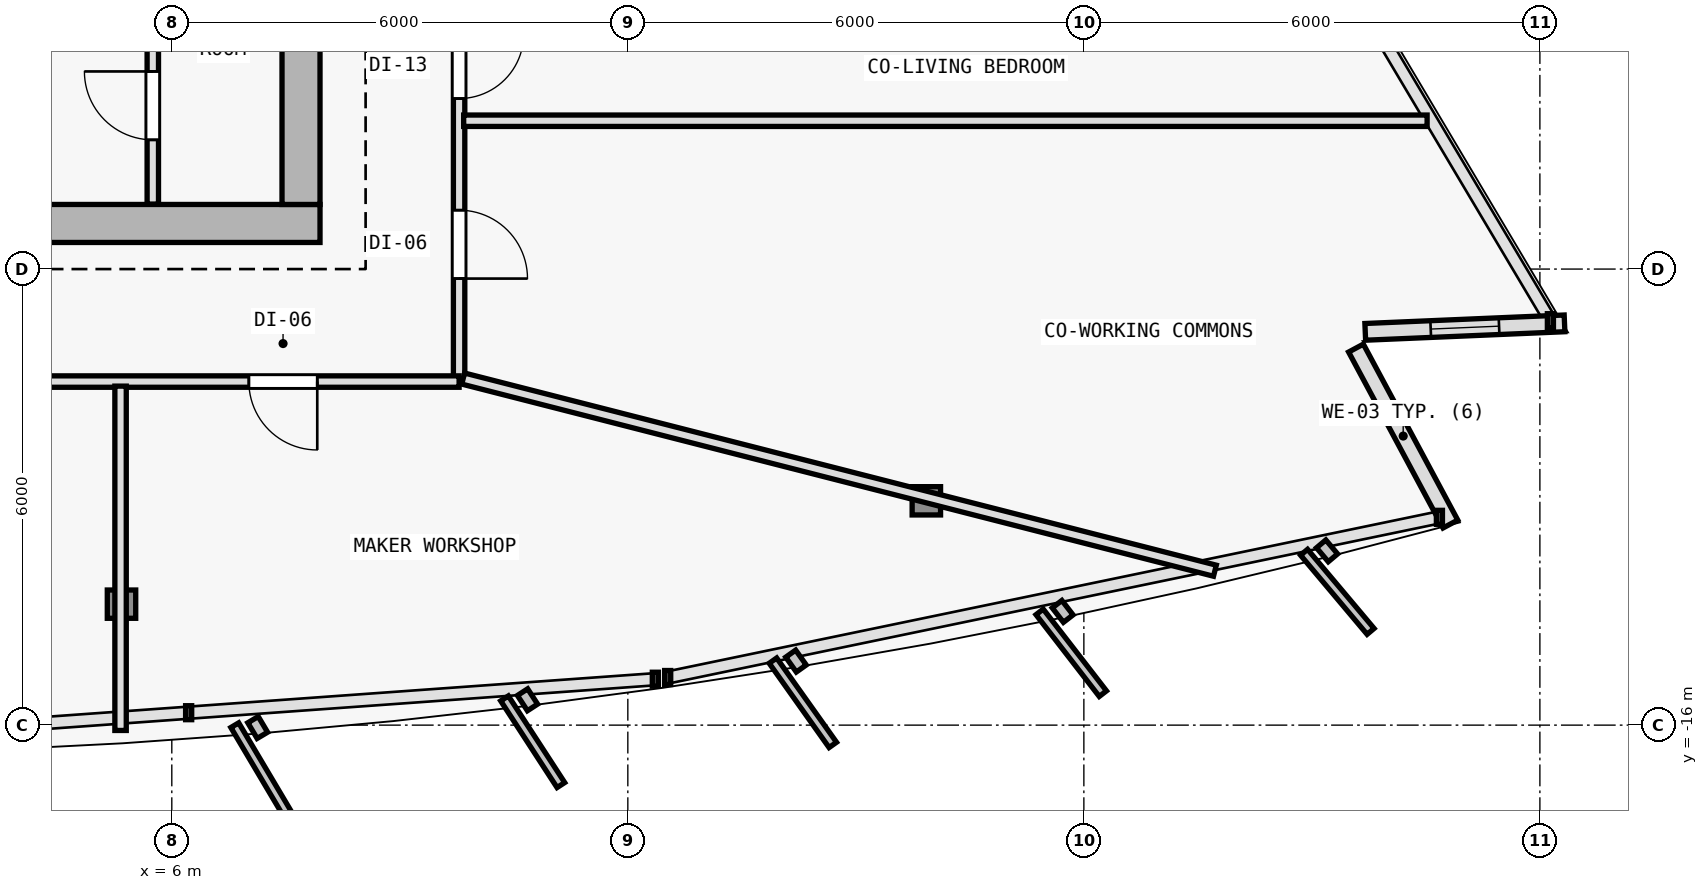
"""IFC4 building model, lengths in metres.
Left out: names, types, materials, properties, quantities, classifications, styles, units other than length and angle.
Written with IfcOpenShell. Run it as: python <this file> out.ifc"""

import sys

from ifc_helpers import new_model, si_unit, direction, frame, frame_2d, origin, origin_2d, place, context, subcontext, project, spatial, rectangle, i_section, extrude, element, fill, save


model = new_model("IFC4")
c1 = context("Model", 3, precision=1e-05, world=origin(), true_north=direction((0.0, 1.0)))
c2 = subcontext(c1, "Body", "Model", "MODEL_VIEW")
j1 = project(units=[si_unit("LENGTHUNIT", "METRE"), si_unit("PLANEANGLEUNIT", "RADIAN")], contexts=[c1])
p1 = place(None, origin())
s1 = spatial("IfcSite", under=j1, at=p1, CompositionType="ELEMENT")
p2 = place(p1, origin())
s2 = spatial("IfcBuilding", under=s1, at=p2, CompositionType="ELEMENT")
p3 = place(p2, frame((0.0, 0.0, 250.8)))
s3 = spatial("IfcBuildingStorey", under=s2, at=p3, CompositionType="ELEMENT", Elevation=250.8)
p4 = place(p3, frame((7.7, -9.4, 0.0), z_axis=(0.0, 0.0, 1.0), x_axis=(1.0, 0.0, 0.0)))
e1 = element("IfcColumn", 1, at=p4, inside=s3, PredefinedType="COLUMN", context=c2, shape_type="SweptSolid", body=[
    extrude(i_section(OverallWidth=0.374, OverallDepth=0.372, WebThickness=0.012, FlangeThickness=0.02, FilletRadius=0.015, at=origin_2d()), origin(), (0.0, 0.0, 1.0), 3.6),
])
p5 = place(p3, frame((5.338, -14.408, 0.005), z_axis=(-0.006865841702, 0.035280909339, 0.999353850072), x_axis=(-0.981585848295, -0.191021523464, 0.0)))
e2 = element("IfcColumn", 2, at=p5, inside=s3, PredefinedType="COLUMN", context=c2, shape_type="SweptSolid", body=[
    extrude(i_section(OverallWidth=0.374, OverallDepth=0.372, WebThickness=0.012, FlangeThickness=0.02, FilletRadius=0.015, at=origin_2d()), origin(), (0.0, 0.0, 1.0), 3.592),
])
p6 = place(p3, frame((15.927, -13.049, 0.005), z_axis=(-0.020594893987, 0.033509183946, 0.999226193078), x_axis=(-0.851954850327, -0.523615252838, 0.0)))
e3 = element("IfcColumn", 3, at=p6, inside=s3, PredefinedType="COLUMN", context=c2, shape_type="SweptSolid", body=[
    extrude(i_section(OverallWidth=0.374, OverallDepth=0.372, WebThickness=0.012, FlangeThickness=0.02, FilletRadius=0.015, at=origin_2d()), origin(), (0.0, 0.0, 1.0), 3.592),
])
p7 = place(p3, frame((21.581, -11.04, 0.0), z_axis=(0.0, 0.0, 1.0), x_axis=(0.472791303324, -0.881174434208, 0.0)))
e4 = element("IfcWall", 4, at=p7, inside=s3, PredefinedType="SOLIDWALL", context=c2, shape_type="SweptSolid", body=[
    extrude(rectangle(XDim=2.627, YDim=0.22, at=frame_2d((1.313, 0.0))), origin(), (0.0, 0.0, 1.0), 3.35),
])
p8 = place(p3, frame((24.324, -10.714, 0.0), z_axis=(0.0, 0.0, 1.0), x_axis=(-0.999095924753, -0.042512740932, 0.0)))
e5 = element("IfcWall", 5, at=p8, inside=s3, PredefinedType="SOLIDWALL", context=c2, shape_type="SweptSolid", body=[
    extrude(rectangle(XDim=2.625, YDim=0.22, at=frame_2d((1.312, 0.0))), origin(), (0.0, 0.0, 1.0), 3.35),
])
p9 = place(p8, frame((0.862, 0.0, 0.62)))
e6 = element("IfcOpeningElement", 6, at=p9, cuts=e5, PredefinedType="OPENING", context=c2, shape_type="SweptSolid", body=[
    extrude(rectangle(XDim=0.9, YDim=1.6, at=frame_2d((0.45, 0.8))), frame((0.0, 0.12, 0.0), z_axis=(0.0, -1.0, 0.0), x_axis=(1.0, 0.0, 0.0)), (0.0, 0.0, 1.0), 0.24),
])
p10 = place(p3, frame((-7.95, -9.4, 0.0), z_axis=(0.0, 0.0, 1.0), x_axis=(1.0, 0.0, 0.0)))
e7 = element("IfcWall", 7, at=p10, inside=s3, PredefinedType="SHEAR", context=c2, shape_type="SweptSolid", body=[
    extrude(rectangle(XDim=15.9, YDim=0.5, at=frame_2d((7.95, 0.0))), origin(), (0.0, 0.0, 1.0), 3.35),
])
p11 = place(p10, frame((9.6, 0.0, 0.0)))
e8 = element("IfcOpeningElement", 8, at=p11, cuts=e7, PredefinedType="OPENING", context=c2, shape_type="SweptSolid", body=[
    extrude(rectangle(XDim=1.5, YDim=2.2, at=frame_2d((0.75, 1.1))), frame((0.0, 0.26, 0.0), z_axis=(0.0, -1.0, 0.0), x_axis=(1.0, 0.0, 0.0)), (0.0, 0.0, 1.0), 0.52),
])
p12 = place(p3, frame((7.7, 9.95, 0.0), z_axis=(0.0, 0.0, 1.0), x_axis=(0.0, -1.0, 0.0)))
e9 = element("IfcWall", 9, at=p12, inside=s3, PredefinedType="SHEAR", context=c2, shape_type="SweptSolid", body=[
    extrude(rectangle(XDim=19.1, YDim=0.5, at=frame_2d((9.55, 0.0))), origin(), (0.0, 0.0, 1.0), 3.35),
])
p13 = place(p3, frame((5.75, -9.145, 0.0), z_axis=(0.0, 0.0, 1.0), x_axis=(0.0, 1.0, 0.0)))
e10 = element("IfcWall", 10, at=p13, inside=s3, PredefinedType="PARTITIONING", context=c2, shape_type="SweptSolid", body=[
    extrude(rectangle(XDim=3.095, YDim=0.15, at=frame_2d((1.547, 0.0))), origin(), (0.0, 0.0, 1.0), 3.35),
])
p14 = place(p13, frame((0.845, 0.0, 0.0)))
e11 = element("IfcOpeningElement", 11, at=p14, cuts=e10, PredefinedType="OPENING", context=c2, shape_type="SweptSolid", body=[
    extrude(rectangle(XDim=0.9, YDim=2.1, at=frame_2d((0.45, 1.05))), frame((0.0, 0.085, 0.0), z_axis=(0.0, -1.0, 0.0), x_axis=(1.0, 0.0, 0.0)), (0.0, 0.0, 1.0), 0.17),
])
p15 = place(p3, frame((9.78, 8.226, 0.0), z_axis=(0.0, 0.0, 1.0), x_axis=(0.0, -1.0, 0.0)))
e12 = element("IfcWall", 12, at=p15, inside=s3, PredefinedType="PARTITIONING", context=c2, shape_type="SweptSolid", body=[
    extrude(rectangle(XDim=19.706, YDim=0.15, at=frame_2d((9.853, 0.0))), origin(), (0.0, 0.0, 1.0), 2.775),
])
p16 = place(p15, frame((17.451, 0.0, 0.0)))
e13 = element("IfcOpeningElement", 13, at=p16, cuts=e12, PredefinedType="OPENING", context=c2, shape_type="SweptSolid", body=[
    extrude(rectangle(XDim=0.9, YDim=2.1, at=frame_2d((0.45, 1.05))), frame((0.0, 0.085, 0.0), z_axis=(0.0, -1.0, 0.0), x_axis=(1.0, 0.0, 0.0)), (0.0, 0.0, 1.0), 0.17),
])
p17 = place(p15, frame((15.133, 0.0, 0.0)))
e14 = element("IfcOpeningElement", 14, at=p17, cuts=e12, PredefinedType="OPENING", context=c2, shape_type="SweptSolid", body=[
    extrude(rectangle(XDim=0.85, YDim=2.1, at=frame_2d((0.425, 1.05))), frame((0.0, 0.085, 0.0), z_axis=(0.0, -1.0, 0.0), x_axis=(1.0, 0.0, 0.0)), (0.0, 0.0, 1.0), 0.17),
])
p18 = place(p15, frame((13.676, 0.0, 0.0)))
e15 = element("IfcOpeningElement", 15, at=p18, cuts=e12, PredefinedType="OPENING", context=c2, shape_type="SweptSolid", body=[
    extrude(rectangle(XDim=0.85, YDim=2.1, at=frame_2d((0.425, 1.05))), frame((0.0, 0.085, 0.0), z_axis=(0.0, -1.0, 0.0), x_axis=(1.0, 0.0, 0.0)), (0.0, 0.0, 1.0), 0.17),
])
p19 = place(p15, frame((12.119, 0.0, 0.0)))
e16 = element("IfcOpeningElement", 16, at=p19, cuts=e12, PredefinedType="OPENING", context=c2, shape_type="SweptSolid", body=[
    extrude(rectangle(XDim=0.85, YDim=2.1, at=frame_2d((0.425, 1.05))), frame((0.0, 0.085, 0.0), z_axis=(0.0, -1.0, 0.0), x_axis=(1.0, 0.0, 0.0)), (0.0, 0.0, 1.0), 0.17),
])
p20 = place(p15, frame((10.022, 0.0, 0.0)))
e17 = element("IfcOpeningElement", 17, at=p20, cuts=e12, PredefinedType="OPENING", context=c2, shape_type="SweptSolid", body=[
    extrude(rectangle(XDim=0.9, YDim=2.1, at=frame_2d((0.45, 1.05))), frame((0.0, 0.085, 0.0), z_axis=(0.0, -1.0, 0.0), x_axis=(1.0, 0.0, 0.0)), (0.0, 0.0, 1.0), 0.17),
])
p21 = place(p15, frame((7.448, 0.0, 0.0)))
e18 = element("IfcOpeningElement", 18, at=p21, cuts=e12, PredefinedType="OPENING", context=c2, shape_type="SweptSolid", body=[
    extrude(rectangle(XDim=0.9, YDim=2.1, at=frame_2d((0.45, 1.05))), frame((0.0, 0.085, 0.0), z_axis=(0.0, -1.0, 0.0), x_axis=(1.0, 0.0, 0.0)), (0.0, 0.0, 1.0), 0.17),
])
p22 = place(p15, frame((4.837, 0.0, 0.0)))
e19 = element("IfcOpeningElement", 19, at=p22, cuts=e12, PredefinedType="OPENING", context=c2, shape_type="SweptSolid", body=[
    extrude(rectangle(XDim=0.9, YDim=2.1, at=frame_2d((0.45, 1.05))), frame((0.0, 0.085, 0.0), z_axis=(0.0, -1.0, 0.0), x_axis=(1.0, 0.0, 0.0)), (0.0, 0.0, 1.0), 0.17),
])
p23 = place(p3, frame((9.78, -11.48, 0.0), z_axis=(0.0, 0.0, 1.0), x_axis=(-1.0, 0.0, 0.0)))
e20 = element("IfcWall", 20, at=p23, inside=s3, PredefinedType="PARTITIONING", context=c2, shape_type="SweptSolid", body=[
    extrude(rectangle(XDim=19.56, YDim=0.15, at=frame_2d((9.78, 0.0))), origin(), (0.0, 0.0, 1.0), 3.025),
])
p24 = place(p23, frame((15.936, 0.0, 0.0)))
e21 = element("IfcOpeningElement", 21, at=p24, cuts=e20, PredefinedType="OPENING", context=c2, shape_type="SweptSolid", body=[
    extrude(rectangle(XDim=0.9, YDim=2.1, at=frame_2d((0.45, 1.05))), frame((0.0, 0.085, 0.0), z_axis=(0.0, -1.0, 0.0), x_axis=(1.0, 0.0, 0.0)), (0.0, 0.0, 1.0), 0.17),
])
p25 = place(p23, frame((8.472, 0.0, 0.0)))
e22 = element("IfcOpeningElement", 22, at=p25, cuts=e20, PredefinedType="OPENING", context=c2, shape_type="SweptSolid", body=[
    extrude(rectangle(XDim=0.9, YDim=2.1, at=frame_2d((0.45, 1.05))), frame((0.0, 0.085, 0.0), z_axis=(0.0, -1.0, 0.0), x_axis=(1.0, 0.0, 0.0)), (0.0, 0.0, 1.0), 0.17),
])
p26 = place(p23, frame((1.866, 0.0, 0.0)))
e23 = element("IfcOpeningElement", 23, at=p26, cuts=e20, PredefinedType="OPENING", context=c2, shape_type="SweptSolid", body=[
    extrude(rectangle(XDim=0.9, YDim=2.1, at=frame_2d((0.45, 1.05))), frame((0.0, 0.085, 0.0), z_axis=(0.0, -1.0, 0.0), x_axis=(1.0, 0.0, 0.0)), (0.0, 0.0, 1.0), 0.17),
])
p27 = place(p3, frame((5.326, -11.54, 0.0), z_axis=(0.0, 0.0, 1.0), x_axis=(0.0, -1.0, 0.0)))
e24 = element("IfcWall", 24, at=p27, inside=s3, PredefinedType="PARTITIONING", context=c2, shape_type="SweptSolid", body=[
    extrude(rectangle(XDim=4.53, YDim=0.15, at=frame_2d((2.265, 0.0))), origin(), (0.0, 0.0, 1.0), 3.015),
])
p28 = place(p3, frame((9.833, -11.441, 0.0), z_axis=(0.0, 0.0, 1.0), x_axis=(0.968857431137, -0.247619220033, 0.0)))
e25 = element("IfcWall", 25, at=p28, inside=s3, PredefinedType="PARTITIONING", context=c2, shape_type="SweptSolid", body=[
    extrude(rectangle(XDim=10.208, YDim=0.15, at=frame_2d((5.104, 0.0))), origin(), (0.0, 0.0, 1.0), 3.015),
])
p29 = place(p3, frame((9.84, -8.049, 0.0), z_axis=(0.0, 0.0, 1.0), x_axis=(1.0, 0.0, 0.0)))
e26 = element("IfcWall", 26, at=p29, inside=s3, PredefinedType="PARTITIONING", context=c2, shape_type="SweptSolid", body=[
    extrude(rectangle(XDim=12.676, YDim=0.15, at=frame_2d((6.338, 0.0))), origin(), (0.0, 0.0, 1.0), 2.825),
])
p30 = place(p9, origin())
e27 = element("IfcWindow", 27, at=p30, inside=s3, PartitioningType="SINGLE_PANEL", PredefinedType="WINDOW", context=c2, shape_type="SweptSolid", body=[
    extrude(rectangle(XDim=0.9, YDim=1.6, at=frame_2d((0.45, 0.8))), frame((0.0, 0.03, 0.0), z_axis=(0.0, -1.0, 0.0), x_axis=(1.0, 0.0, 0.0)), (0.0, 0.0, 1.0), 0.06),
])
fill(e6, e27)
p31 = place(p14, origin())
e28 = element("IfcDoor", 28, at=p31, inside=s3, OperationType="SINGLE_SWING_RIGHT", PredefinedType="DOOR", context=c2, shape_type="SweptSolid", body=[
    extrude(rectangle(XDim=0.9, YDim=2.1, at=frame_2d((0.45, 1.05))), frame((0.0, 0.025, 0.0), z_axis=(0.0, -1.0, 0.0), x_axis=(1.0, 0.0, 0.0)), (0.0, 0.0, 1.0), 0.05),
])
fill(e11, e28)
p32 = place(p26, origin())
e29 = element("IfcDoor", 29, at=p32, inside=s3, OperationType="SINGLE_SWING_LEFT", PredefinedType="DOOR", context=c2, shape_type="SweptSolid", body=[
    extrude(rectangle(XDim=0.9, YDim=2.1, at=frame_2d((0.45, 1.05))), frame((0.0, 0.025, 0.0), z_axis=(0.0, -1.0, 0.0), x_axis=(1.0, 0.0, 0.0)), (0.0, 0.0, 1.0), 0.05),
])
fill(e23, e29)
p33 = place(p16, origin())
e30 = element("IfcDoor", 30, at=p33, inside=s3, OperationType="SINGLE_SWING_RIGHT", PredefinedType="DOOR", context=c2, shape_type="SweptSolid", body=[
    extrude(rectangle(XDim=0.9, YDim=2.1, at=frame_2d((0.45, 1.05))), frame((0.0, 0.025, 0.0), z_axis=(0.0, -1.0, 0.0), x_axis=(1.0, 0.0, 0.0)), (0.0, 0.0, 1.0), 0.05),
])
fill(e13, e30)
p34 = place(p17, origin())
e31 = element("IfcDoor", 31, at=p34, inside=s3, OperationType="SINGLE_SWING_LEFT", PredefinedType="DOOR", context=c2, shape_type="SweptSolid", body=[
    extrude(rectangle(XDim=0.85, YDim=2.1, at=frame_2d((0.425, 1.05))), frame((0.0, 0.025, 0.0), z_axis=(0.0, -1.0, 0.0), x_axis=(1.0, 0.0, 0.0)), (0.0, 0.0, 1.0), 0.05),
])
fill(e14, e31)
save(model, sys.argv[1])
